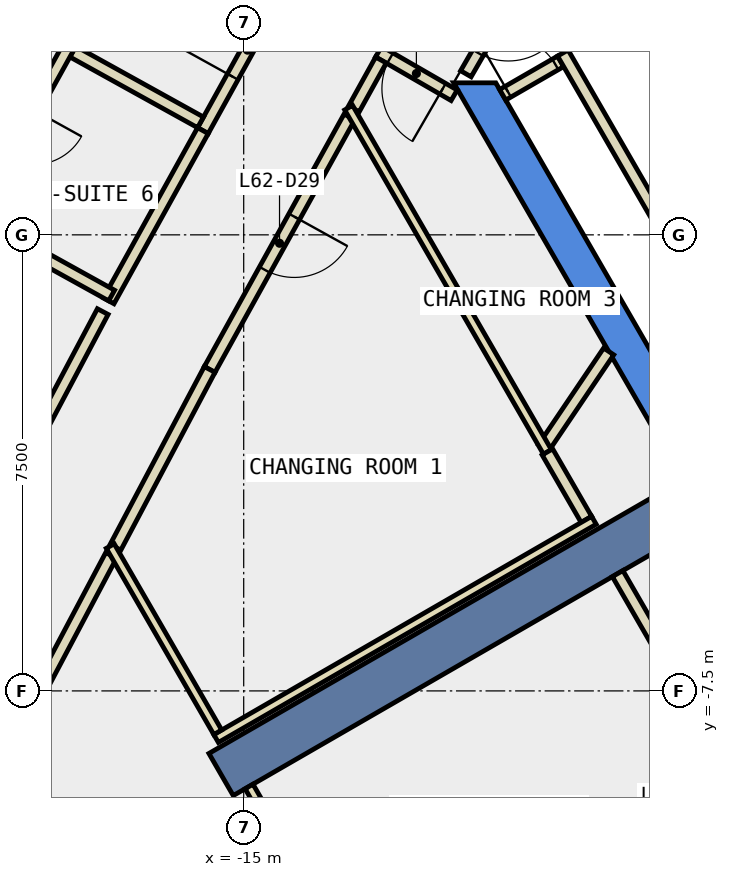
"""IFC4 building model, lengths in metres.
Left out: names, types, materials, properties, quantities, classifications, styles, units other than length and angle.
Written with IfcOpenShell. Run it as: python <this file> out.ifc"""

import sys

from ifc_helpers import new_model, si_unit, direction, frame, frame_2d, origin, place, context, subcontext, project, spatial, polyline, rectangle, outline, extrude, element, fill, save


model = new_model("IFC4")
c1 = context("Model", 3, precision=1e-05, world=origin(), true_north=direction((0.0, 1.0)))
c2 = subcontext(c1, "Body", "Model", "MODEL_VIEW")
j1 = project(units=[si_unit("LENGTHUNIT", "METRE"), si_unit("PLANEANGLEUNIT", "RADIAN")], contexts=[c1])
p1 = place(None, origin())
s1 = spatial("IfcSite", under=j1, at=p1, CompositionType="ELEMENT")
p2 = place(p1, origin())
s2 = spatial("IfcBuilding", under=s1, at=p2, CompositionType="ELEMENT")
p3 = place(p2, frame((0.0, 0.0, 270.2)))
s3 = spatial("IfcBuildingStorey", under=s2, at=p3, CompositionType="ELEMENT", Elevation=270.2)
p4 = place(p3, frame((0.0, 0.0, -0.34)))
e1 = element("IfcWall", 1, at=p4, inside=s3, PredefinedType="SHEAR", context=c2, shape_type="SweptSolid", body=[
    extrude(outline(polyline([(-11.547, 2.5), (-5.774, -7.5), (-5.427, -6.9), (-10.854, 2.5), (-11.547, 2.5)])), origin(), (0.0, 0.0, 1.0), 3.6),
])
p5 = place(p3, frame((-7.578, -4.375, -0.34), z_axis=(0.0, 0.0, 1.0), x_axis=(-0.866024315419, -0.5000018851, 0.0)))
e2 = element("IfcWall", 2, at=p5, inside=s3, PredefinedType="SHEAR", context=c2, shape_type="SweptSolid", body=[
    extrude(rectangle(XDim=9.0, YDim=0.8, at=frame_2d((4.5, 0.0))), origin(), (0.0, 0.0, 1.0), 3.6),
])
p6 = place(p3, frame((-11.539, 2.295, 0.0), z_axis=(0.0, 0.0, 1.0), x_axis=(-0.866023989838, 0.500002449018, 0.0)))
e3 = element("IfcWall", 3, at=p6, inside=s3, PredefinedType="PARTITIONING", context=c2, shape_type="SweptSolid", body=[
    extrude(rectangle(XDim=1.434, YDim=0.2, at=frame_2d((0.717, 0.0))), origin(), (0.0, 0.0, 1.0), 3.26),
])
p7 = place(p6, frame((0.217, 0.0, 0.0)))
e4 = element("IfcOpeningElement", 4, at=p7, cuts=e3, PredefinedType="OPENING", context=c2, shape_type="SweptSolid", body=[
    extrude(rectangle(XDim=1.0, YDim=2.1, at=frame_2d((0.5, 1.05))), frame((0.0, 0.11, 0.0), z_axis=(0.0, -1.0, 0.0), x_axis=(1.0, 0.0, 0.0)), (0.0, 0.0, 1.0), 0.22),
])
p8 = place(p3, frame((-12.743, 2.875, 0.0), z_axis=(0.0, 0.0, 1.0), x_axis=(-0.484334040176, -0.8748831565, 0.0)))
e5 = element("IfcWall", 5, at=p8, inside=s3, PredefinedType="PARTITIONING", context=c2, shape_type="SweptSolid", body=[
    extrude(rectangle(XDim=0.919, YDim=0.2, at=frame_2d((0.459, 0.0))), origin(), (0.0, 0.0, 1.0), 3.26),
])
p9 = place(p3, frame((-13.261, 1.939, 0.0), z_axis=(0.0, 0.0, 1.0), x_axis=(-0.484323615817, -0.874888927329, 0.0)))
e6 = element("IfcWall", 6, at=p9, inside=s3, PredefinedType="PARTITIONING", context=c2, shape_type="SweptSolid", body=[
    extrude(rectangle(XDim=4.747, YDim=0.2, at=frame_2d((2.374, 0.0))), origin(), (0.0, 0.0, 1.0), 3.26),
])
p10 = place(p9, frame((1.874, 0.0, 0.0)))
e7 = element("IfcOpeningElement", 7, at=p10, cuts=e6, PredefinedType="OPENING", context=c2, shape_type="SweptSolid", body=[
    extrude(rectangle(XDim=1.0, YDim=2.1, at=frame_2d((0.5, 1.05))), frame((0.0, 0.11, 0.0), z_axis=(0.0, -1.0, 0.0), x_axis=(1.0, 0.0, 0.0)), (0.0, 0.0, 1.0), 0.22),
])
p11 = place(p3, frame((-15.56, -2.214, 0.0), z_axis=(0.0, 0.0, 1.0), x_axis=(-0.468104679961, -0.883673021314, 0.0)))
e8 = element("IfcWall", 8, at=p11, inside=s3, PredefinedType="PARTITIONING", context=c2, shape_type="SweptSolid", body=[
    extrude(rectangle(XDim=3.309, YDim=0.2, at=frame_2d((1.654, 0.0))), origin(), (0.0, 0.0, 1.0), 3.26),
])
p12 = place(p3, frame((-17.18, -5.271, 0.0), z_axis=(0.0, 0.0, 1.0), x_axis=(-0.468212372113, -0.883615965564, 0.0)))
e9 = element("IfcWall", 9, at=p12, inside=s3, PredefinedType="PARTITIONING", context=c2, shape_type="SweptSolid", body=[
    extrude(rectangle(XDim=2.557, YDim=0.2, at=frame_2d((1.278, 0.0))), origin(), (0.0, 0.0, 1.0), 3.26),
])
p13 = place(p3, frame((-15.671, 1.714, 0.0), z_axis=(0.0, 0.0, 1.0), x_axis=(0.484203367026, 0.874955484216, 0.0)))
e10 = element("IfcWall", 10, at=p13, inside=s3, PredefinedType="PARTITIONING", context=c2, shape_type="SweptSolid", body=[
    extrude(rectangle(XDim=3.025, YDim=0.2, at=frame_2d((1.513, 0.0))), origin(), (0.0, 0.0, 1.0), 3.26),
])
p14 = place(p13, frame((1.013, 0.0, 0.0)))
e11 = element("IfcOpeningElement", 11, at=p14, cuts=e10, PredefinedType="OPENING", context=c2, shape_type="SweptSolid", body=[
    extrude(rectangle(XDim=1.0, YDim=2.1, at=frame_2d((0.5, 1.05))), frame((0.0, 0.11, 0.0), z_axis=(0.0, -1.0, 0.0), x_axis=(1.0, 0.0, 0.0)), (0.0, 0.0, 1.0), 0.22),
])
p15 = place(p3, frame((-20.229, -6.754, 0.0), z_axis=(0.0, 0.0, 1.0), x_axis=(0.468313568794, 0.883562335822, 0.0)))
e12 = element("IfcWall", 12, at=p15, inside=s3, PredefinedType="PARTITIONING", context=c2, shape_type="SweptSolid", body=[
    extrude(rectangle(XDim=6.216, YDim=0.2, at=frame_2d((3.108, 0.0))), origin(), (0.0, 0.0, 1.0), 3.26),
])
p16 = place(p3, frame((-17.221, -1.085, 0.0), z_axis=(0.0, 0.0, 1.0), x_axis=(0.48445041864, 0.874818719438, 0.0)))
e13 = element("IfcWall", 13, at=p16, inside=s3, PredefinedType="PARTITIONING", context=c2, shape_type="SweptSolid", body=[
    extrude(rectangle(XDim=3.2, YDim=0.2, at=frame_2d((1.6, 0.0))), origin(), (0.0, 0.0, 1.0), 3.26),
])
p17 = place(p3, frame((-10.741, 2.303, 0.0), z_axis=(0.0, 0.0, 1.0), x_axis=(0.866063652425, 0.499933745558, 0.0)))
e14 = element("IfcWall", 14, at=p17, inside=s3, PredefinedType="PARTITIONING", context=c2, shape_type="SweptSolid", body=[
    extrude(rectangle(XDim=1.1, YDim=0.2, at=frame_2d((0.55, 0.0))), origin(), (0.0, 0.0, 1.0), 3.26),
])
p18 = place(p17, frame((0.1, 0.0, 0.0)))
e15 = element("IfcOpeningElement", 15, at=p18, cuts=e14, PredefinedType="OPENING", context=c2, shape_type="SweptSolid", body=[
    extrude(rectangle(XDim=0.9, YDim=2.1, at=frame_2d((0.45, 1.05))), frame((0.0, 0.11, 0.0), z_axis=(0.0, -1.0, 0.0), x_axis=(1.0, 0.0, 0.0)), (0.0, 0.0, 1.0), 0.22),
])
p19 = place(p3, frame((-9.751, 2.99, 0.0), z_axis=(0.0, 0.0, 1.0), x_axis=(0.500012163284, -0.866018381195, 0.0)))
e16 = element("IfcWall", 16, at=p19, inside=s3, PredefinedType="PARTITIONING", context=c2, shape_type="SweptSolid", body=[
    extrude(rectangle(XDim=8.0, YDim=0.2, at=frame_2d((4.0, 0.0))), origin(), (0.0, 0.0, 1.0), 3.26),
])
p20 = place(p3, frame((-10.069, -3.504, 0.0), z_axis=(0.0, 0.0, 1.0), x_axis=(0.559779346026, 0.828641710127, 0.0)))
e17 = element("IfcWall", 17, at=p20, inside=s3, PredefinedType="PARTITIONING", context=c2, shape_type="SweptSolid", body=[
    extrude(rectangle(XDim=1.915, YDim=0.2, at=frame_2d((0.958, 0.0))), origin(), (0.0, 0.0, 1.0), 3.26),
])
p21 = place(p3, frame((-13.274, 2.092, 0.0), z_axis=(0.0, 0.0, 1.0), x_axis=(0.500002592159, -0.866023907196, 0.0)))
e18 = element("IfcWall", 18, at=p21, inside=s3, PredefinedType="PARTITIONING", context=c2, shape_type="SweptSolid", body=[
    extrude(rectangle(XDim=6.538, YDim=0.15, at=frame_2d((3.269, 0.0))), origin(), (0.0, 0.0, 1.0), 3.26),
])
p22 = place(p3, frame((-9.364, -4.68, 0.0), z_axis=(0.0, 0.0, 1.0), x_axis=(-0.500052244015, 0.865995238587, 0.0)))
e19 = element("IfcWall", 19, at=p22, inside=s3, PredefinedType="PARTITIONING", context=c2, shape_type="SweptSolid", body=[
    extrude(rectangle(XDim=1.281, YDim=0.2, at=frame_2d((0.641, 0.0))), origin(), (0.0, 0.0, 1.0), 3.26),
])
p23 = place(p3, frame((-7.8, -7.39, 0.0), z_axis=(0.0, 0.0, 1.0), x_axis=(-0.499977374825, 0.866038466041, 0.0)))
e20 = element("IfcWall", 20, at=p23, inside=s3, PredefinedType="PARTITIONING", context=c2, shape_type="SweptSolid", body=[
    extrude(rectangle(XDim=2.1, YDim=0.2, at=frame_2d((1.05, 0.0))), origin(), (0.0, 0.0, 1.0), 3.26),
])
p24 = place(p3, frame((-9.24, -4.695, 0.0), z_axis=(0.0, 0.0, 1.0), x_axis=(-0.866015037582, -0.500017954359, 0.0)))
e21 = element("IfcWall", 21, at=p24, inside=s3, PredefinedType="PARTITIONING", context=c2, shape_type="SweptSolid", body=[
    extrude(rectangle(XDim=7.176, YDim=0.15, at=frame_2d((3.588, 0.0))), origin(), (0.0, 0.0, 1.0), 3.26),
])
p25 = place(p3, frame((-15.427, -8.18, 0.0), z_axis=(0.0, 0.0, 1.0), x_axis=(-0.500045204515, 0.865999303373, 0.0)))
e22 = element("IfcWall", 22, at=p25, inside=s3, PredefinedType="PARTITIONING", context=c2, shape_type="SweptSolid", body=[
    extrude(rectangle(XDim=3.536, YDim=0.15, at=frame_2d((1.768, 0.0))), origin(), (0.0, 0.0, 1.0), 3.26),
])
p26 = place(p3, frame((-12.769, -12.784, 0.0), z_axis=(0.0, 0.0, 1.0), x_axis=(-0.499998569178, 0.866026229868, 0.0)))
e23 = element("IfcWall", 23, at=p26, inside=s3, PredefinedType="PARTITIONING", context=c2, shape_type="SweptSolid", body=[
    extrude(rectangle(XDim=4.286, YDim=0.15, at=frame_2d((2.143, 0.0))), origin(), (0.0, 0.0, 1.0), 3.26),
])
p27 = place(p3, frame((-15.71, 1.85, 0.0), z_axis=(0.0, 0.0, 1.0), x_axis=(-0.874842414173, 0.484407628308, 0.0)))
e24 = element("IfcWall", 24, at=p27, inside=s3, PredefinedType="PARTITIONING", context=c2, shape_type="SweptSolid", body=[
    extrude(rectangle(XDim=2.401, YDim=0.2, at=frame_2d((1.2, 0.0))), origin(), (0.0, 0.0, 1.0), 3.26),
])
p28 = place(p3, frame((-17.849, 3.148, 0.0), z_axis=(0.0, 0.0, 1.0), x_axis=(-0.484257957482, -0.874925271446, 0.0)))
e25 = element("IfcWall", 25, at=p28, inside=s3, PredefinedType="PARTITIONING", context=c2, shape_type="SweptSolid", body=[
    extrude(rectangle(XDim=3.399, YDim=0.2, at=frame_2d((1.699, 0.0))), origin(), (0.0, 0.0, 1.0), 3.26),
])
p29 = place(p28, frame((1.25, 0.0, 0.0)))
e26 = element("IfcOpeningElement", 26, at=p29, cuts=e25, PredefinedType="OPENING", context=c2, shape_type="SweptSolid", body=[
    extrude(rectangle(XDim=0.9, YDim=2.1, at=frame_2d((0.45, 1.05))), frame((0.0, 0.11, 0.0), z_axis=(0.0, -1.0, 0.0), x_axis=(1.0, 0.0, 0.0)), (0.0, 0.0, 1.0), 0.22),
])
p30 = place(p3, frame((-19.36, 0.213, 0.0), z_axis=(0.0, 0.0, 1.0), x_axis=(0.874939003568, -0.484233146362, 0.0)))
e27 = element("IfcWall", 27, at=p30, inside=s3, PredefinedType="PARTITIONING", context=c2, shape_type="SweptSolid", body=[
    extrude(rectangle(XDim=2.501, YDim=0.2, at=frame_2d((1.25, 0.0))), origin(), (0.0, 0.0, 1.0), 3.26),
])
p31 = place(p3, frame((-10.449, 4.203, 0.0), z_axis=(0.0, 0.0, 1.0), x_axis=(-0.499914839587, -0.866074565589, 0.0)))
e28 = element("IfcWall", 28, at=p31, inside=s3, PredefinedType="PARTITIONING", context=c2, shape_type="SweptSolid", body=[
    extrude(rectangle(XDim=1.794, YDim=0.2, at=frame_2d((0.897, 0.0))), origin(), (0.0, 0.0, 1.0), 2.4),
])
p32 = place(p31, frame((0.397, 0.0, 0.0)))
e29 = element("IfcOpeningElement", 29, at=p32, cuts=e28, PredefinedType="OPENING", context=c2, shape_type="SweptSolid", body=[
    extrude(rectangle(XDim=1.0, YDim=2.1, at=frame_2d((0.5, 1.05))), frame((0.0, 0.11, 0.0), z_axis=(0.0, -1.0, 0.0), x_axis=(1.0, 0.0, 0.0)), (0.0, 0.0, 1.0), 0.22),
])
p33 = place(p3, frame((-6.25, 2.01, 0.0), z_axis=(0.0, 0.0, 1.0), x_axis=(-0.86611865017, 0.499838457731, 0.0)))
e30 = element("IfcWall", 30, at=p33, inside=s3, PredefinedType="STANDARD", context=c2, shape_type="SweptSolid", body=[
    extrude(rectangle(XDim=2.733, YDim=0.2, at=frame_2d((1.366, 0.0))), origin(), (0.0, 0.0, 1.0), 3.26),
])
p34 = place(p14, origin())
e31 = element("IfcDoor", 31, at=p34, inside=s3, OperationType="SINGLE_SWING_RIGHT", PredefinedType="DOOR", context=c2, shape_type="SweptSolid", body=[
    extrude(rectangle(XDim=1.0, YDim=2.1, at=frame_2d((0.5, 1.05))), frame((0.0, 0.025, 0.0), z_axis=(0.0, -1.0, 0.0), x_axis=(1.0, 0.0, 0.0)), (0.0, 0.0, 1.0), 0.05),
])
fill(e11, e31)
p35 = place(p10, origin())
e32 = element("IfcDoor", 32, at=p35, inside=s3, OperationType="SINGLE_SWING_LEFT", PredefinedType="DOOR", context=c2, shape_type="SweptSolid", body=[
    extrude(rectangle(XDim=1.0, YDim=2.1, at=frame_2d((0.5, 1.05))), frame((0.0, 0.025, 0.0), z_axis=(0.0, -1.0, 0.0), x_axis=(1.0, 0.0, 0.0)), (0.0, 0.0, 1.0), 0.05),
])
fill(e7, e32)
p36 = place(p7, origin())
e33 = element("IfcDoor", 33, at=p36, inside=s3, OperationType="SINGLE_SWING_RIGHT", PredefinedType="DOOR", context=c2, shape_type="SweptSolid", body=[
    extrude(rectangle(XDim=1.0, YDim=2.1, at=frame_2d((0.5, 1.05))), frame((0.0, 0.025, 0.0), z_axis=(0.0, -1.0, 0.0), x_axis=(1.0, 0.0, 0.0)), (0.0, 0.0, 1.0), 0.05),
])
fill(e4, e33)
p37 = place(p18, origin())
e34 = element("IfcDoor", 34, at=p37, inside=s3, OperationType="SINGLE_SWING_RIGHT", PredefinedType="DOOR", context=c2, shape_type="SweptSolid", body=[
    extrude(rectangle(XDim=0.9, YDim=2.1, at=frame_2d((0.45, 1.05))), frame((0.0, 0.025, 0.0), z_axis=(0.0, -1.0, 0.0), x_axis=(1.0, 0.0, 0.0)), (0.0, 0.0, 1.0), 0.05),
])
fill(e15, e34)
p38 = place(p32, origin())
e35 = element("IfcDoor", 35, at=p38, inside=s3, OperationType="SINGLE_SWING_LEFT", PredefinedType="DOOR", context=c2, shape_type="SweptSolid", body=[
    extrude(rectangle(XDim=1.0, YDim=2.1, at=frame_2d((0.5, 1.05))), frame((0.0, 0.025, 0.0), z_axis=(0.0, -1.0, 0.0), x_axis=(1.0, 0.0, 0.0)), (0.0, 0.0, 1.0), 0.05),
])
fill(e29, e35)
save(model, sys.argv[1])
